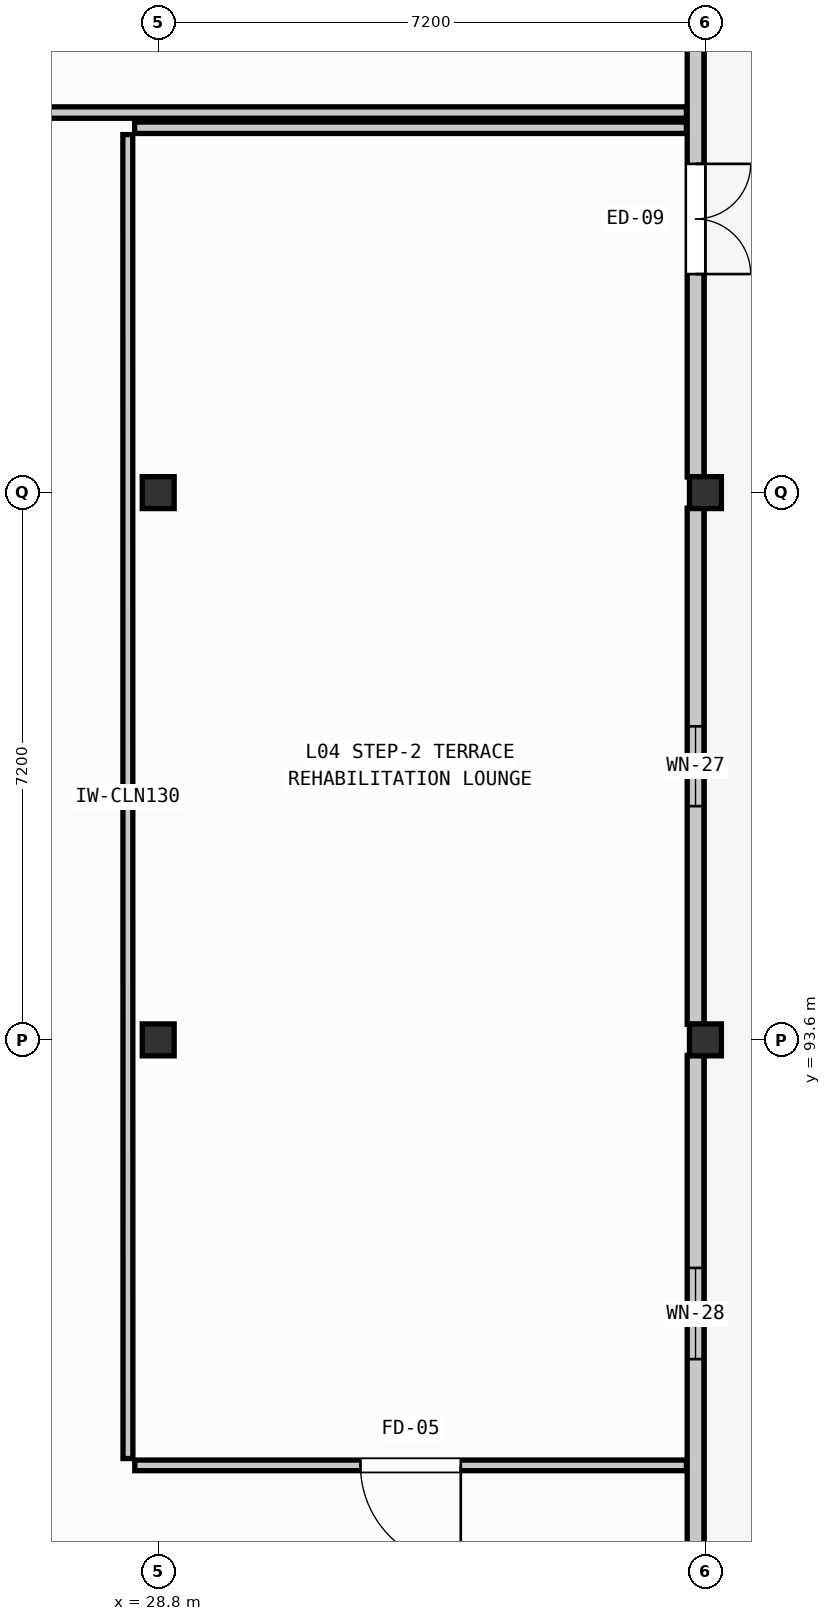
"""IFC4 building model, lengths in metres.
Left out: names, types, materials, properties, quantities, classifications, styles, units other than length and angle.
Written with IfcOpenShell. Run it as: python <this file> out.ifc"""

import sys

from ifc_helpers import new_model, si_unit, direction, frame, frame_2d, origin, origin_2d, place, context, subcontext, project, spatial, rectangle, extrude, element, fill, save


model = new_model("IFC4")
c1 = context("Model", 3, precision=1e-05, world=origin(), true_north=direction((0.0, 1.0)))
c2 = subcontext(c1, "Body", "Model", "MODEL_VIEW")
j1 = project(units=[si_unit("LENGTHUNIT", "METRE"), si_unit("PLANEANGLEUNIT", "RADIAN")], contexts=[c1])
p1 = place(None, origin())
s1 = spatial("IfcSite", under=j1, at=p1, CompositionType="ELEMENT")
p2 = place(p1, origin())
s2 = spatial("IfcBuilding", under=s1, at=p2, CompositionType="ELEMENT")
p3 = place(p2, frame((0.0, 0.0, 13.5)))
s3 = spatial("IfcBuildingStorey", under=s2, at=p3, CompositionType="ELEMENT", Elevation=13.5)
for number, where, z_axis, x_axis in (
    (1, (28.8, 93.6, 0.0), (0.0, 0.0, 1.0), (1.0, 0.0, 0.0)),
    (2, (28.8, 100.8, 0.0), (0.0, 0.0, 1.0), (1.0, 0.0, 0.0)),
):
    element("IfcColumn", number, at=place(p3, frame(where, z_axis=z_axis, x_axis=x_axis)), inside=s3, PredefinedType="COLUMN", context=c2, shape_type="SweptSolid", body=[
        extrude(rectangle(XDim=0.42, YDim=0.42, at=origin_2d()), origin(), (0.0, 0.0, 1.0), 3.99),
    ])
for number, where, z_axis, x_axis in (
    (3, (36.0, 93.6, 0.0), (0.0, 0.0, 1.0), (1.0, 0.0, 0.0)),
    (4, (36.0, 100.8, 0.0), (0.0, 0.0, 1.0), (1.0, 0.0, 0.0)),
):
    element("IfcColumn", number, at=place(p3, frame(where, z_axis=z_axis, x_axis=x_axis)), inside=s3, PredefinedType="COLUMN", context=c2, shape_type="SweptSolid", body=[
        extrude(rectangle(XDim=0.42, YDim=0.42, at=origin_2d()), origin(), (0.0, 0.0, 1.0), 4.0),
    ])
p4 = place(p3, frame((35.87, 107.795, 0.0), z_axis=(0.0, 0.0, 1.0), x_axis=(0.0, -1.0, 0.0)))
e5 = element("IfcWall", 5, at=p4, inside=s3, PredefinedType="SOLIDWALL", context=c2, shape_type="SweptSolid", body=[
    extrude(rectangle(XDim=6.79, YDim=0.22, at=frame_2d((3.395, 0.0))), origin(), (0.0, 0.0, 1.0), 3.03),
])
p5 = place(p4, frame((2.67, 0.0, 0.0)))
e6 = element("IfcOpeningElement", 6, at=p5, cuts=e5, PredefinedType="OPENING", context=c2, shape_type="SweptSolid", body=[
    extrude(rectangle(XDim=1.45, YDim=2.25, at=frame_2d((0.725, 1.125))), frame((0.0, 0.12, 0.0), z_axis=(0.0, -1.0, 0.0), x_axis=(1.0, 0.0, 0.0)), (0.0, 0.0, 1.0), 0.24),
])
p6 = place(p3, frame((35.87, 100.595, 0.0), z_axis=(0.0, 0.0, 1.0), x_axis=(0.0, -1.0, 0.0)))
e7 = element("IfcWall", 7, at=p6, inside=s3, PredefinedType="SOLIDWALL", context=c2, shape_type="SweptSolid", body=[
    extrude(rectangle(XDim=6.79, YDim=0.22, at=frame_2d((3.395, 0.0))), origin(), (0.0, 0.0, 1.0), 3.03),
])
p7 = place(p6, frame((2.87, 0.0, 0.95)))
e8 = element("IfcOpeningElement", 8, at=p7, cuts=e7, PredefinedType="OPENING", context=c2, shape_type="SweptSolid", body=[
    extrude(rectangle(XDim=1.05, YDim=1.25, at=frame_2d((0.525, 0.625))), frame((0.0, 0.12, 0.0), z_axis=(0.0, -1.0, 0.0), x_axis=(1.0, 0.0, 0.0)), (0.0, 0.0, 1.0), 0.24),
])
p8 = place(p3, frame((35.87, 93.395, 0.0), z_axis=(0.0, 0.0, 1.0), x_axis=(0.0, -1.0, 0.0)))
e9 = element("IfcWall", 9, at=p8, inside=s3, PredefinedType="SOLIDWALL", context=c2, shape_type="SweptSolid", body=[
    extrude(rectangle(XDim=6.79, YDim=0.22, at=frame_2d((3.395, 0.0))), origin(), (0.0, 0.0, 1.0), 3.03),
])
p9 = place(p8, frame((2.795, 0.0, 0.95)))
e10 = element("IfcOpeningElement", 10, at=p9, cuts=e9, PredefinedType="OPENING", context=c2, shape_type="SweptSolid", body=[
    extrude(rectangle(XDim=1.2, YDim=1.25, at=frame_2d((0.6, 0.625))), frame((0.0, 0.12, 0.0), z_axis=(0.0, -1.0, 0.0), x_axis=(1.0, 0.0, 0.0)), (0.0, 0.0, 1.0), 0.24),
])
p10 = place(p3, frame((28.49, 105.6, 0.0), z_axis=(0.0, 0.0, 1.0), x_axis=(1.0, 0.0, 0.0)))
e11 = element("IfcWall", 11, at=p10, inside=s3, PredefinedType="PARTITIONING", context=c2, shape_type="SweptSolid", body=[
    extrude(rectangle(XDim=7.26, YDim=0.15, at=frame_2d((3.63, 0.0))), origin(), (0.0, 0.0, 1.0), 3.35),
])
p11 = place(p3, frame((35.75, 88.002, 0.0), z_axis=(0.0, 0.0, 1.0), x_axis=(-1.0, 0.0, 0.0)))
e12 = element("IfcWall", 12, at=p11, inside=s3, PredefinedType="PARTITIONING", context=c2, shape_type="SweptSolid", body=[
    extrude(rectangle(XDim=7.258, YDim=0.14, at=frame_2d((3.629, 0.0))), origin(), (0.0, 0.0, 1.0), 3.35),
])
p12 = place(p11, frame((2.969, 0.0, 0.0)))
e13 = element("IfcOpeningElement", 13, at=p12, cuts=e12, PredefinedType="OPENING", context=c2, shape_type="SweptSolid", body=[
    extrude(rectangle(XDim=1.32, YDim=2.2, at=frame_2d((0.66, 1.1))), frame((0.0, 0.08, 0.0), z_axis=(0.0, -1.0, 0.0), x_axis=(1.0, 0.0, 0.0)), (0.0, 0.0, 1.0), 0.16),
])
p13 = place(p3, frame((28.402, 88.092, 0.0), z_axis=(0.0, 0.0, 1.0), x_axis=(-0.00012614936, 0.999999992043, 0.0)))
e14 = element("IfcWall", 14, at=p13, inside=s3, PredefinedType="PARTITIONING", context=c2, shape_type="SweptSolid", body=[
    extrude(rectangle(XDim=17.418, YDim=0.13, at=frame_2d((8.709, 0.0))), origin(), (0.0, 0.0, 1.0), 3.97),
])
p14 = place(p3, frame((35.75, 105.8, 0.0), z_axis=(0.0, 0.0, 1.0), x_axis=(-1.0, 0.0, 0.0)))
e15 = element("IfcWall", 15, at=p14, inside=s3, PredefinedType="PARTITIONING", context=c2, shape_type="SweptSolid", body=[
    extrude(rectangle(XDim=10.481, YDim=0.15, at=frame_2d((5.24, 0.0))), origin(), (0.0, 0.0, 1.0), 3.35),
])
p15 = place(p5, origin())
e16 = element("IfcDoor", 16, at=p15, inside=s3, OperationType="DOUBLE_DOOR_SINGLE_SWING", PredefinedType="DOOR", context=c2, shape_type="SweptSolid", body=[
    extrude(rectangle(XDim=1.45, YDim=2.25, at=frame_2d((0.725, 1.125))), frame((0.0, 0.025, 0.0), z_axis=(0.0, -1.0, 0.0), x_axis=(1.0, 0.0, 0.0)), (0.0, 0.0, 1.0), 0.05),
])
fill(e6, e16)
p16 = place(p7, origin())
e17 = element("IfcWindow", 17, at=p16, inside=s3, PartitioningType="SINGLE_PANEL", PredefinedType="WINDOW", context=c2, shape_type="SweptSolid", body=[
    extrude(rectangle(XDim=1.05, YDim=1.25, at=frame_2d((0.525, 0.625))), frame((0.0, 0.03, 0.0), z_axis=(0.0, -1.0, 0.0), x_axis=(1.0, 0.0, 0.0)), (0.0, 0.0, 1.0), 0.06),
])
fill(e8, e17)
p17 = place(p9, origin())
e18 = element("IfcWindow", 18, at=p17, inside=s3, PartitioningType="SINGLE_PANEL", PredefinedType="WINDOW", context=c2, shape_type="SweptSolid", body=[
    extrude(rectangle(XDim=1.2, YDim=1.25, at=frame_2d((0.6, 0.625))), frame((0.0, 0.03, 0.0), z_axis=(0.0, -1.0, 0.0), x_axis=(1.0, 0.0, 0.0)), (0.0, 0.0, 1.0), 0.06),
])
fill(e10, e18)
p18 = place(p12, origin())
e19 = element("IfcDoor", 19, at=p18, inside=s3, OperationType="SINGLE_SWING_LEFT", PredefinedType="DOOR", context=c2, shape_type="SweptSolid", body=[
    extrude(rectangle(XDim=1.32, YDim=2.2, at=frame_2d((0.66, 1.1))), frame((0.0, 0.025, 0.0), z_axis=(0.0, -1.0, 0.0), x_axis=(1.0, 0.0, 0.0)), (0.0, 0.0, 1.0), 0.05),
])
fill(e13, e19)
save(model, sys.argv[1])
